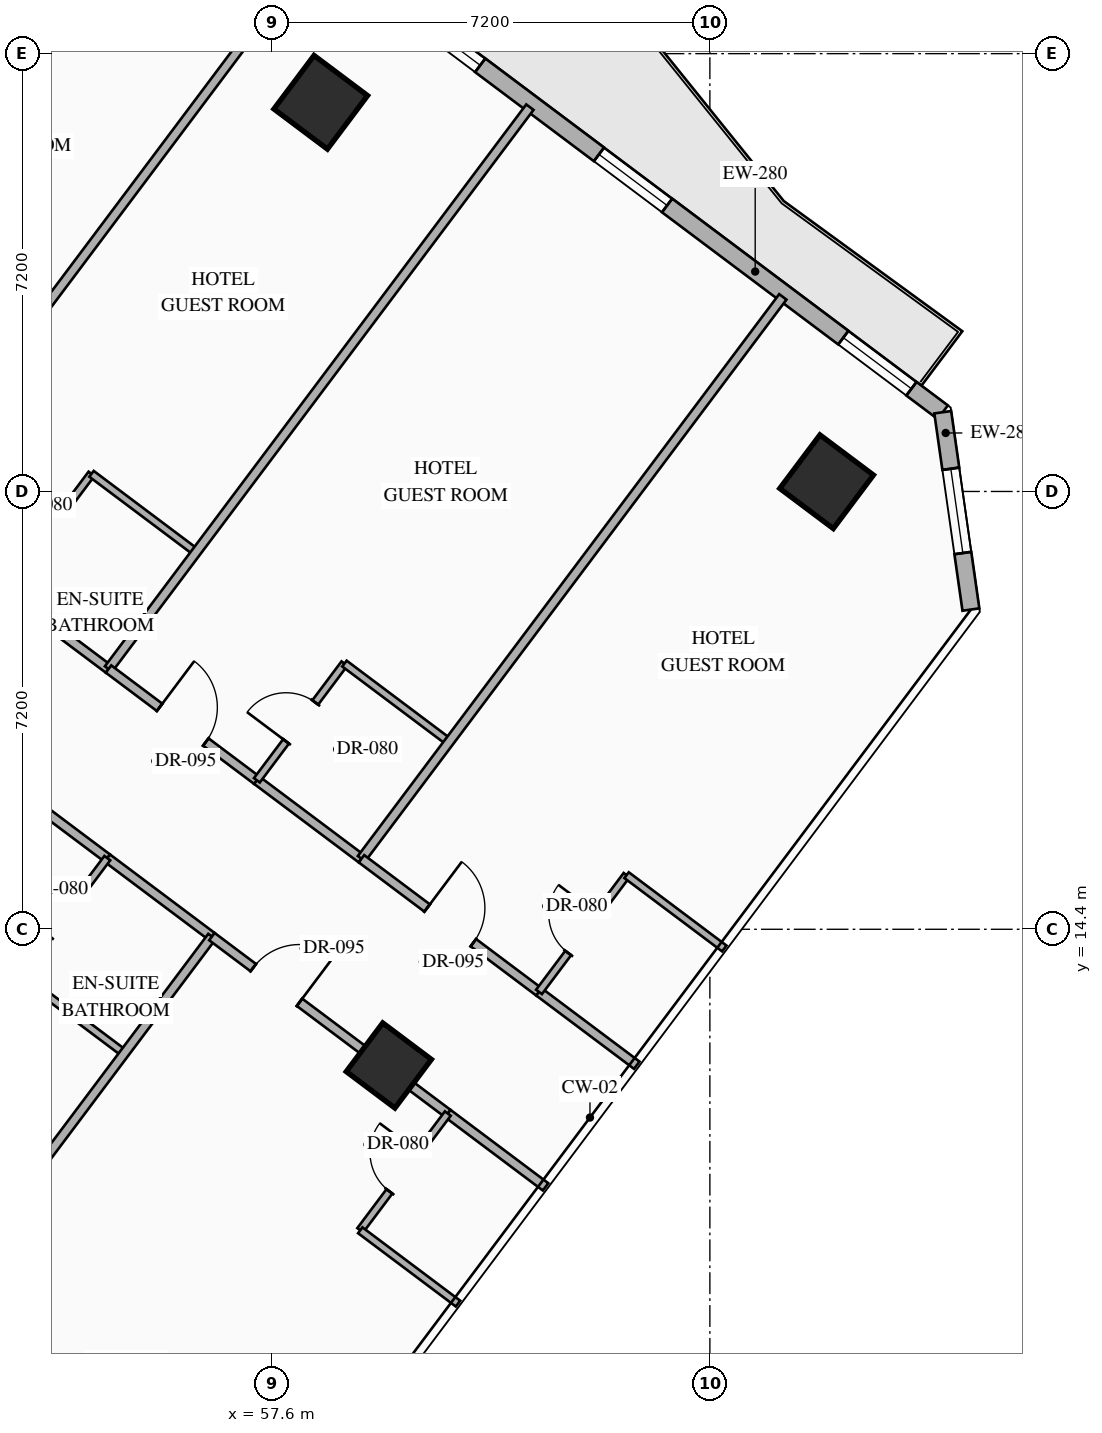
"""IFC4 building model, lengths in metres.
Left out: names, types, materials, properties, quantities, classifications, styles, units other than length and angle.
Written with IfcOpenShell. Run it as: python <this file> out.ifc"""

import sys

from ifc_helpers import new_model, si_unit, direction, frame, frame_2d, origin, origin_2d, place, context, subcontext, project, spatial, rectangle, hollow_rectangle, extrude, element, fill, save


model = new_model("IFC4")
c1 = context("Model", 3, precision=1e-05, world=origin(), true_north=direction((0.0, 1.0)))
c2 = subcontext(c1, "Body", "Model", "MODEL_VIEW")
j1 = project(units=[si_unit("LENGTHUNIT", "METRE"), si_unit("PLANEANGLEUNIT", "RADIAN")], contexts=[c1])
p1 = place(None, origin())
s1 = spatial("IfcSite", under=j1, at=p1, CompositionType="ELEMENT")
p2 = place(p1, origin())
s2 = spatial("IfcBuilding", under=s1, at=p2, CompositionType="ELEMENT")
p3 = place(p2, frame((0.0, 0.0, 46.65)))
s3 = spatial("IfcBuildingStorey", under=s2, at=p3, CompositionType="ELEMENT", Elevation=46.65)
for number, where, z_axis, x_axis in (
    (1, (58.4, 28.0, 0.0), (0.0, 0.0, 1.0), (0.8, -0.6, 0.0)),
    (2, (66.72, 21.76, 0.0), (0.0, 0.0, 1.0), (0.8, -0.6, 0.0)),
):
    element("IfcColumn", number, at=place(p3, frame(where, z_axis=z_axis, x_axis=x_axis)), inside=s3, PredefinedType="COLUMN", context=c2, shape_type="SweptSolid", body=[
        extrude(hollow_rectangle(XDim=1.1, YDim=1.1, WallThickness=0.04, at=origin_2d()), origin(), (0.0, 0.0, 1.0), 3.35),
    ])
p4 = place(p3, frame((59.52, 12.16, 0.0), z_axis=(0.0, 0.0, 1.0), x_axis=(0.799999996291, -0.600000004945, 0.0)))
e3 = element("IfcColumn", 3, at=p4, inside=s3, PredefinedType="COLUMN", context=c2, shape_type="SweptSolid", body=[
    extrude(hollow_rectangle(XDim=1.0, YDim=1.0, WallThickness=0.038, at=origin_2d()), origin(), (0.0, 0.0, 1.0), 3.35),
])
p5 = place(p3, frame((44.86, 40.73, 0.0), z_axis=(0.0, 0.0, 1.0), x_axis=(0.800006902154, -0.599990797017, 0.0)))
e4 = element("IfcWall", 4, at=p5, inside=s3, PredefinedType="STANDARD", context=c2, shape_type="SweptSolid", body=[
    extrude(rectangle(XDim=29.712, YDim=0.28, at=frame_2d((14.856, 0.0))), origin(), (0.0, 0.0, 1.0), 3.13),
])
p6 = place(p5, frame((14.249, 0.0, 0.0)))
e5 = element("IfcOpeningElement", 5, at=p6, cuts=e4, PredefinedType="OPENING", context=c2, shape_type="SweptSolid", body=[
    extrude(rectangle(XDim=1.1, YDim=2.2, at=frame_2d((0.55, 1.1))), frame((0.0, 0.15, 0.0), z_axis=(0.0, -1.0, 0.0), x_axis=(1.0, 0.0, 0.0)), (0.0, 0.0, 1.0), 0.3),
])
p7 = place(p5, frame((1.612, 0.0, 0.85)))
e6 = element("IfcOpeningElement", 6, at=p7, cuts=e4, PredefinedType="OPENING", context=c2, shape_type="SweptSolid", body=[
    extrude(rectangle(XDim=1.4, YDim=1.8, at=frame_2d((0.7, 0.9))), frame((0.0, 0.15, 0.0), z_axis=(0.0, -1.0, 0.0), x_axis=(1.0, 0.0, 0.0)), (0.0, 0.0, 1.0), 0.3),
])
p8 = place(p5, frame((5.667, 0.0, 0.85)))
e7 = element("IfcOpeningElement", 7, at=p8, cuts=e4, PredefinedType="OPENING", context=c2, shape_type="SweptSolid", body=[
    extrude(rectangle(XDim=1.4, YDim=1.8, at=frame_2d((0.7, 0.9))), frame((0.0, 0.15, 0.0), z_axis=(0.0, -1.0, 0.0), x_axis=(1.0, 0.0, 0.0)), (0.0, 0.0, 1.0), 0.3),
])
p9 = place(p5, frame((9.912, 0.0, 0.85)))
e8 = element("IfcOpeningElement", 8, at=p9, cuts=e4, PredefinedType="OPENING", context=c2, shape_type="SweptSolid", body=[
    extrude(rectangle(XDim=1.4, YDim=1.8, at=frame_2d((0.7, 0.9))), frame((0.0, 0.15, 0.0), z_axis=(0.0, -1.0, 0.0), x_axis=(1.0, 0.0, 0.0)), (0.0, 0.0, 1.0), 0.3),
])
p10 = place(p5, frame((18.803, 0.0, 0.85)))
e9 = element("IfcOpeningElement", 9, at=p10, cuts=e4, PredefinedType="OPENING", context=c2, shape_type="SweptSolid", body=[
    extrude(rectangle(XDim=1.4, YDim=1.8, at=frame_2d((0.7, 0.9))), frame((0.0, 0.15, 0.0), z_axis=(0.0, -1.0, 0.0), x_axis=(1.0, 0.0, 0.0)), (0.0, 0.0, 1.0), 0.3),
])
p11 = place(p5, frame((22.645, 0.0, 0.85)))
e10 = element("IfcOpeningElement", 10, at=p11, cuts=e4, PredefinedType="OPENING", context=c2, shape_type="SweptSolid", body=[
    extrude(rectangle(XDim=1.4, YDim=1.8, at=frame_2d((0.7, 0.9))), frame((0.0, 0.15, 0.0), z_axis=(0.0, -1.0, 0.0), x_axis=(1.0, 0.0, 0.0)), (0.0, 0.0, 1.0), 0.3),
])
p12 = place(p5, frame((27.668, 0.0, 0.85)))
e11 = element("IfcOpeningElement", 11, at=p12, cuts=e4, PredefinedType="OPENING", context=c2, shape_type="SweptSolid", body=[
    extrude(rectangle(XDim=1.4, YDim=1.8, at=frame_2d((0.7, 0.9))), frame((0.0, 0.15, 0.0), z_axis=(0.0, -1.0, 0.0), x_axis=(1.0, 0.0, 0.0)), (0.0, 0.0, 1.0), 0.3),
])
p13 = place(p3, frame((68.63, 22.903, 0.0), z_axis=(0.0, 0.0, 1.0), x_axis=(0.141285803956, -0.989968848803, 0.0)))
e12 = element("IfcWall", 12, at=p13, inside=s3, PredefinedType="STANDARD", context=c2, shape_type="SweptSolid", body=[
    extrude(rectangle(XDim=3.278, YDim=0.28, at=frame_2d((1.639, 0.0))), origin(), (0.0, 0.0, 1.0), 3.13),
])
p14 = place(p13, frame((0.939, 0.0, 0.85)))
e13 = element("IfcOpeningElement", 13, at=p14, cuts=e12, PredefinedType="OPENING", context=c2, shape_type="SweptSolid", body=[
    extrude(rectangle(XDim=1.4, YDim=1.8, at=frame_2d((0.7, 0.9))), frame((0.0, 0.15, 0.0), z_axis=(0.0, -1.0, 0.0), x_axis=(1.0, 0.0, 0.0)), (0.0, 0.0, 1.0), 0.3),
])
for number, where, z_axis, x_axis in (
    (14, (47.87, 23.96, 0.0), (0.0, 0.0, 1.0), (0.6, 0.8, 0.0)),
    (15, (51.39, 21.32, 0.0), (0.0, 0.0, 1.0), (0.6, 0.8, 0.0)),
):
    element("IfcWall", number, at=place(p3, frame(where, z_axis=z_axis, x_axis=x_axis)), inside=s3, PredefinedType="PARTITIONING", context=c2, shape_type="SweptSolid", body=[
        extrude(rectangle(XDim=11.55, YDim=0.15, at=frame_2d((5.775, 0.0))), origin(), (0.0, 0.0, 1.0), 3.13),
    ])
p15 = place(p3, frame((53.19, 19.97, 0.0), z_axis=(0.0, 0.0, 1.0), x_axis=(0.79998637334, -0.60001816845, 0.0)))
e16 = element("IfcWall", 16, at=p15, inside=s3, PredefinedType="PARTITIONING", context=c2, shape_type="SweptSolid", body=[
    extrude(rectangle(XDim=2.15, YDim=0.15, at=frame_2d((1.075, 0.0))), origin(), (0.0, 0.0, 1.0), 2.775),
])
p16 = place(p3, frame((53.19, 19.97, 0.0), z_axis=(0.0, 0.0, 1.0), x_axis=(0.6, 0.8, 0.0)))
e17 = element("IfcWall", 17, at=p16, inside=s3, PredefinedType="PARTITIONING", context=c2, shape_type="SweptSolid", body=[
    extrude(rectangle(XDim=2.4, YDim=0.12, at=frame_2d((1.2, 0.0))), origin(), (0.0, 0.0, 1.0), 3.13),
])
p17 = place(p16, frame((0.8, 0.0, 0.0)))
e18 = element("IfcOpeningElement", 18, at=p17, cuts=e17, PredefinedType="OPENING", context=c2, shape_type="SweptSolid", body=[
    extrude(rectangle(XDim=0.8, YDim=2.06, at=frame_2d((0.4, 1.03))), frame((0.0, 0.07, 0.0), z_axis=(0.0, -1.0, 0.0), x_axis=(1.0, 0.0, 0.0)), (0.0, 0.0, 1.0), 0.14),
])
p18 = place(p3, frame((54.63, 21.89, 0.0), z_axis=(0.0, 0.0, 1.0), x_axis=(0.800081749437, -0.599890985279, 0.0)))
e19 = element("IfcWall", 19, at=p18, inside=s3, PredefinedType="PARTITIONING", context=c2, shape_type="SweptSolid", body=[
    extrude(rectangle(XDim=2.15, YDim=0.12, at=frame_2d((1.075, 0.0))), origin(), (0.0, 0.0, 1.0), 3.13),
])
p19 = place(p3, frame((54.91, 18.68, 0.0), z_axis=(0.0, 0.0, 1.0), x_axis=(0.60001014597, 0.799992390422, 0.0)))
e20 = element("IfcWall", 20, at=p19, inside=s3, PredefinedType="PARTITIONING", context=c2, shape_type="SweptSolid", body=[
    extrude(rectangle(XDim=11.55, YDim=0.15, at=frame_2d((5.775, 0.0))), origin(), (0.0, 0.0, 1.0), 3.13),
])
p20 = place(p3, frame((54.91, 18.68, 0.0), z_axis=(0.0, 0.0, 1.0), x_axis=(0.800048024332, -0.599935962218, 0.0)))
e21 = element("IfcWall", 21, at=p20, inside=s3, PredefinedType="PARTITIONING", context=c2, shape_type="SweptSolid", body=[
    extrude(rectangle(XDim=3.05, YDim=0.15, at=frame_2d((1.525, 0.0))), origin(), (0.0, 0.0, 1.0), 2.775),
])
p21 = place(p20, frame((1.05, 0.0, 0.0)))
e22 = element("IfcOpeningElement", 22, at=p21, cuts=e21, PredefinedType="OPENING", context=c2, shape_type="SweptSolid", body=[
    extrude(rectangle(XDim=0.95, YDim=2.15, at=frame_2d((0.475, 1.075))), frame((0.0, 0.085, 0.0), z_axis=(0.0, -1.0, 0.0), x_axis=(1.0, 0.0, 0.0)), (0.0, 0.0, 1.0), 0.17),
])
p22 = place(p3, frame((57.35, 16.85, 0.0), z_axis=(0.0, 0.0, 1.0), x_axis=(0.79998637334, -0.60001816845, 0.0)))
e23 = element("IfcWall", 23, at=p22, inside=s3, PredefinedType="PARTITIONING", context=c2, shape_type="SweptSolid", body=[
    extrude(rectangle(XDim=2.15, YDim=0.15, at=frame_2d((1.075, 0.0))), origin(), (0.0, 0.0, 1.0), 2.775),
])
p23 = place(p3, frame((57.35, 16.85, 0.0), z_axis=(0.0, 0.0, 1.0), x_axis=(0.6, 0.8, 0.0)))
e24 = element("IfcWall", 24, at=p23, inside=s3, PredefinedType="PARTITIONING", context=c2, shape_type="SweptSolid", body=[
    extrude(rectangle(XDim=2.4, YDim=0.12, at=frame_2d((1.2, 0.0))), origin(), (0.0, 0.0, 1.0), 3.13),
])
p24 = place(p23, frame((0.8, 0.0, 0.0)))
e25 = element("IfcOpeningElement", 25, at=p24, cuts=e24, PredefinedType="OPENING", context=c2, shape_type="SweptSolid", body=[
    extrude(rectangle(XDim=0.8, YDim=2.06, at=frame_2d((0.4, 1.03))), frame((0.0, 0.07, 0.0), z_axis=(0.0, -1.0, 0.0), x_axis=(1.0, 0.0, 0.0)), (0.0, 0.0, 1.0), 0.14),
])
p25 = place(p3, frame((58.79, 18.77, 0.0), z_axis=(0.0, 0.0, 1.0), x_axis=(0.79998637334, -0.60001816845, 0.0)))
e26 = element("IfcWall", 26, at=p25, inside=s3, PredefinedType="PARTITIONING", context=c2, shape_type="SweptSolid", body=[
    extrude(rectangle(XDim=2.15, YDim=0.12, at=frame_2d((1.075, 0.0))), origin(), (0.0, 0.0, 1.0), 3.13),
])
p26 = place(p3, frame((59.07, 15.56, 0.0), z_axis=(0.0, 0.0, 1.0), x_axis=(0.599996617946, 0.80000253653, 0.0)))
e27 = element("IfcWall", 27, at=p26, inside=s3, PredefinedType="PARTITIONING", context=c2, shape_type="SweptSolid", body=[
    extrude(rectangle(XDim=11.55, YDim=0.15, at=frame_2d((5.775, 0.0))), origin(), (0.0, 0.0, 1.0), 3.13),
])
p27 = place(p3, frame((59.07, 15.56, 0.0), z_axis=(0.0, 0.0, 1.0), x_axis=(0.8, -0.6, 0.0)))
e28 = element("IfcWall", 28, at=p27, inside=s3, PredefinedType="PARTITIONING", context=c2, shape_type="SweptSolid", body=[
    extrude(rectangle(XDim=3.65, YDim=0.15, at=frame_2d((1.825, 0.0))), origin(), (0.0, 0.0, 1.0), 2.775),
])
p28 = place(p27, frame((1.35, 0.0, 0.0)))
e29 = element("IfcOpeningElement", 29, at=p28, cuts=e28, PredefinedType="OPENING", context=c2, shape_type="SweptSolid", body=[
    extrude(rectangle(XDim=0.95, YDim=2.15, at=frame_2d((0.475, 1.075))), frame((0.0, 0.085, 0.0), z_axis=(0.0, -1.0, 0.0), x_axis=(1.0, 0.0, 0.0)), (0.0, 0.0, 1.0), 0.17),
])
p29 = place(p3, frame((61.99, 13.37, 0.0), z_axis=(0.0, 0.0, 1.0), x_axis=(0.79997084737, -0.600038868206, 0.0)))
e30 = element("IfcWall", 30, at=p29, inside=s3, PredefinedType="PARTITIONING", context=c2, shape_type="SweptSolid", body=[
    extrude(rectangle(XDim=2.01, YDim=0.15, at=frame_2d((1.005, 0.0))), origin(), (0.0, 0.0, 1.0), 3.13),
])
p30 = place(p3, frame((61.99, 13.37, 0.0), z_axis=(0.0, 0.0, 1.0), x_axis=(0.6, 0.8, 0.0)))
e31 = element("IfcWall", 31, at=p30, inside=s3, PredefinedType="PARTITIONING", context=c2, shape_type="SweptSolid", body=[
    extrude(rectangle(XDim=2.4, YDim=0.12, at=frame_2d((1.2, 0.0))), origin(), (0.0, 0.0, 1.0), 3.13),
])
p31 = place(p30, frame((0.8, 0.0, 0.0)))
e32 = element("IfcOpeningElement", 32, at=p31, cuts=e31, PredefinedType="OPENING", context=c2, shape_type="SweptSolid", body=[
    extrude(rectangle(XDim=0.8, YDim=2.06, at=frame_2d((0.4, 1.03))), frame((0.0, 0.07, 0.0), z_axis=(0.0, -1.0, 0.0), x_axis=(1.0, 0.0, 0.0)), (0.0, 0.0, 1.0), 0.14),
])
p32 = place(p3, frame((63.43, 15.29, 0.0), z_axis=(0.0, 0.0, 1.0), x_axis=(0.800014574191, -0.599980567254, 0.0)))
e33 = element("IfcWall", 33, at=p32, inside=s3, PredefinedType="PARTITIONING", context=c2, shape_type="SweptSolid", body=[
    extrude(rectangle(XDim=2.01, YDim=0.12, at=frame_2d((1.005, 0.0))), origin(), (0.0, 0.0, 1.0), 3.13),
])
p33 = place(p3, frame((46.37, 21.96, 0.0), z_axis=(0.0, 0.0, 1.0), x_axis=(0.799997249048, -0.600003667918, 0.0)))
e34 = element("IfcWall", 34, at=p33, inside=s3, PredefinedType="PARTITIONING", context=c2, shape_type="SweptSolid", body=[
    extrude(rectangle(XDim=10.65, YDim=0.15, at=frame_2d((5.325, 0.0))), origin(), (0.0, 0.0, 1.0), 2.425),
])
p34 = place(p33, frame((3.062, 0.0, 0.0)))
e35 = element("IfcOpeningElement", 35, at=p34, cuts=e34, PredefinedType="OPENING", context=c2, shape_type="SweptSolid", body=[
    extrude(rectangle(XDim=0.95, YDim=2.15, at=frame_2d((0.475, 1.075))), frame((0.0, 0.085, 0.0), z_axis=(0.0, -1.0, 0.0), x_axis=(1.0, 0.0, 0.0)), (0.0, 0.0, 1.0), 0.17),
])
p35 = place(p3, frame((54.89, 15.57, 0.0), z_axis=(0.0, 0.0, 1.0), x_axis=(0.800027249606, -0.599963665473, 0.0)))
e36 = element("IfcWall", 36, at=p35, inside=s3, PredefinedType="PARTITIONING", context=c2, shape_type="SweptSolid", body=[
    extrude(rectangle(XDim=2.15, YDim=0.15, at=frame_2d((1.075, 0.0))), origin(), (0.0, 0.0, 1.0), 2.425),
])
p36 = place(p3, frame((53.45, 13.65, 0.0), z_axis=(0.0, 0.0, 1.0), x_axis=(0.599951172744, 0.800036618114, 0.0)))
e37 = element("IfcWall", 37, at=p36, inside=s3, PredefinedType="PARTITIONING", context=c2, shape_type="SweptSolid", body=[
    extrude(rectangle(XDim=2.4, YDim=0.12, at=frame_2d((1.2, 0.0))), origin(), (0.0, 0.0, 1.0), 3.13),
])
p37 = place(p36, frame((0.8, 0.0, 0.0)))
e38 = element("IfcOpeningElement", 38, at=p37, cuts=e37, PredefinedType="OPENING", context=c2, shape_type="SweptSolid", body=[
    extrude(rectangle(XDim=0.8, YDim=2.06, at=frame_2d((0.4, 1.03))), frame((0.0, 0.07, 0.0), z_axis=(0.0, -1.0, 0.0), x_axis=(1.0, 0.0, 0.0)), (0.0, 0.0, 1.0), 0.14),
])
p38 = place(p3, frame((53.45, 13.65, 0.0), z_axis=(0.0, 0.0, 1.0), x_axis=(0.800040880289, -0.59994548908, 0.0)))
e39 = element("IfcWall", 39, at=p38, inside=s3, PredefinedType="PARTITIONING", context=c2, shape_type="SweptSolid", body=[
    extrude(rectangle(XDim=2.15, YDim=0.12, at=frame_2d((1.075, 0.0))), origin(), (0.0, 0.0, 1.0), 3.13),
])
p39 = place(p3, frame((49.8, 5.2, 0.0), z_axis=(0.0, 0.0, 1.0), x_axis=(0.6, 0.8, 0.0)))
e40 = element("IfcWall", 40, at=p39, inside=s3, PredefinedType="PARTITIONING", context=c2, shape_type="SweptSolid", body=[
    extrude(rectangle(XDim=11.35, YDim=0.15, at=frame_2d((5.675, 0.0))), origin(), (0.0, 0.0, 1.0), 3.13),
])
p40 = place(p3, frame((56.61, 14.28, 0.0), z_axis=(0.0, 0.0, 1.0), x_axis=(0.8, -0.6, 0.0)))
e41 = element("IfcWall", 41, at=p40, inside=s3, PredefinedType="PARTITIONING", context=c2, shape_type="SweptSolid", body=[
    extrude(rectangle(XDim=4.85, YDim=0.15, at=frame_2d((2.425, 0.0))), origin(), (0.0, 0.0, 1.0), 2.425),
])
p41 = place(p40, frame((0.851, 0.0, 0.0)))
e42 = element("IfcOpeningElement", 42, at=p41, cuts=e41, PredefinedType="OPENING", context=c2, shape_type="SweptSolid", body=[
    extrude(rectangle(XDim=0.95, YDim=2.15, at=frame_2d((0.475, 1.075))), frame((0.0, 0.085, 0.0), z_axis=(0.0, -1.0, 0.0), x_axis=(1.0, 0.0, 0.0)), (0.0, 0.0, 1.0), 0.17),
])
p42 = place(p3, frame((60.49, 11.37, 0.0), z_axis=(0.0, 0.0, 1.0), x_axis=(0.79997084737, -0.600038868206, 0.0)))
e43 = element("IfcWall", 43, at=p42, inside=s3, PredefinedType="PARTITIONING", context=c2, shape_type="SweptSolid", body=[
    extrude(rectangle(XDim=2.01, YDim=0.15, at=frame_2d((1.005, 0.0))), origin(), (0.0, 0.0, 1.0), 3.13),
])
p43 = place(p3, frame((59.05, 9.45, 0.0), z_axis=(0.0, 0.0, 1.0), x_axis=(0.599951172744, 0.800036618114, 0.0)))
e44 = element("IfcWall", 44, at=p43, inside=s3, PredefinedType="PARTITIONING", context=c2, shape_type="SweptSolid", body=[
    extrude(rectangle(XDim=2.4, YDim=0.12, at=frame_2d((1.2, 0.0))), origin(), (0.0, 0.0, 1.0), 3.13),
])
p44 = place(p43, frame((0.8, 0.0, 0.0)))
e45 = element("IfcOpeningElement", 45, at=p44, cuts=e44, PredefinedType="OPENING", context=c2, shape_type="SweptSolid", body=[
    extrude(rectangle(XDim=0.8, YDim=2.06, at=frame_2d((0.4, 1.03))), frame((0.0, 0.07, 0.0), z_axis=(0.0, -1.0, 0.0), x_axis=(1.0, 0.0, 0.0)), (0.0, 0.0, 1.0), 0.14),
])
p45 = place(p3, frame((59.05, 9.45, 0.0), z_axis=(0.0, 0.0, 1.0), x_axis=(0.79997084737, -0.600038868206, 0.0)))
e46 = element("IfcWall", 46, at=p45, inside=s3, PredefinedType="PARTITIONING", context=c2, shape_type="SweptSolid", body=[
    extrude(rectangle(XDim=2.01, YDim=0.12, at=frame_2d((1.005, 0.0))), origin(), (0.0, 0.0, 1.0), 3.13),
])
p46 = place(p10, origin())
e47 = element("IfcWindow", 47, at=p46, inside=s3, PartitioningType="SINGLE_PANEL", PredefinedType="WINDOW", context=c2, shape_type="SweptSolid", body=[
    extrude(rectangle(XDim=1.4, YDim=1.8, at=frame_2d((0.7, 0.9))), frame((0.0, 0.03, 0.0), z_axis=(0.0, -1.0, 0.0), x_axis=(1.0, 0.0, 0.0)), (0.0, 0.0, 1.0), 0.06),
])
fill(e9, e47)
p47 = place(p11, origin())
e48 = element("IfcWindow", 48, at=p47, inside=s3, PartitioningType="SINGLE_PANEL", PredefinedType="WINDOW", context=c2, shape_type="SweptSolid", body=[
    extrude(rectangle(XDim=1.4, YDim=1.8, at=frame_2d((0.7, 0.9))), frame((0.0, 0.03, 0.0), z_axis=(0.0, -1.0, 0.0), x_axis=(1.0, 0.0, 0.0)), (0.0, 0.0, 1.0), 0.06),
])
fill(e10, e48)
p48 = place(p12, origin())
e49 = element("IfcWindow", 49, at=p48, inside=s3, PartitioningType="SINGLE_PANEL", PredefinedType="WINDOW", context=c2, shape_type="SweptSolid", body=[
    extrude(rectangle(XDim=1.4, YDim=1.8, at=frame_2d((0.7, 0.9))), frame((0.0, 0.03, 0.0), z_axis=(0.0, -1.0, 0.0), x_axis=(1.0, 0.0, 0.0)), (0.0, 0.0, 1.0), 0.06),
])
fill(e11, e49)
p49 = place(p14, origin())
e50 = element("IfcWindow", 50, at=p49, inside=s3, PartitioningType="SINGLE_PANEL", PredefinedType="WINDOW", context=c2, shape_type="SweptSolid", body=[
    extrude(rectangle(XDim=1.4, YDim=1.8, at=frame_2d((0.7, 0.9))), frame((0.0, 0.03, 0.0), z_axis=(0.0, -1.0, 0.0), x_axis=(1.0, 0.0, 0.0)), (0.0, 0.0, 1.0), 0.06),
])
fill(e13, e50)
p50 = place(p17, origin())
e51 = element("IfcDoor", 51, at=p50, inside=s3, OperationType="SINGLE_SWING_RIGHT", PredefinedType="DOOR", context=c2, shape_type="SweptSolid", body=[
    extrude(rectangle(XDim=0.8, YDim=2.06, at=frame_2d((0.4, 1.03))), frame((0.0, 0.025, 0.0), z_axis=(0.0, -1.0, 0.0), x_axis=(1.0, 0.0, 0.0)), (0.0, 0.0, 1.0), 0.05),
])
fill(e18, e51)
p51 = place(p21, origin())
e52 = element("IfcDoor", 52, at=p51, inside=s3, OperationType="SINGLE_SWING_LEFT", PredefinedType="DOOR", context=c2, shape_type="SweptSolid", body=[
    extrude(rectangle(XDim=0.95, YDim=2.15, at=frame_2d((0.475, 1.075))), frame((0.0, 0.025, 0.0), z_axis=(0.0, -1.0, 0.0), x_axis=(1.0, 0.0, 0.0)), (0.0, 0.0, 1.0), 0.05),
])
fill(e22, e52)
p52 = place(p24, origin())
e53 = element("IfcDoor", 53, at=p52, inside=s3, OperationType="SINGLE_SWING_LEFT", PredefinedType="DOOR", context=c2, shape_type="SweptSolid", body=[
    extrude(rectangle(XDim=0.8, YDim=2.06, at=frame_2d((0.4, 1.03))), frame((0.0, 0.025, 0.0), z_axis=(0.0, -1.0, 0.0), x_axis=(1.0, 0.0, 0.0)), (0.0, 0.0, 1.0), 0.05),
])
fill(e25, e53)
p53 = place(p28, origin())
e54 = element("IfcDoor", 54, at=p53, inside=s3, OperationType="SINGLE_SWING_LEFT", PredefinedType="DOOR", context=c2, shape_type="SweptSolid", body=[
    extrude(rectangle(XDim=0.95, YDim=2.15, at=frame_2d((0.475, 1.075))), frame((0.0, 0.025, 0.0), z_axis=(0.0, -1.0, 0.0), x_axis=(1.0, 0.0, 0.0)), (0.0, 0.0, 1.0), 0.05),
])
fill(e29, e54)
p54 = place(p31, origin())
e55 = element("IfcDoor", 55, at=p54, inside=s3, OperationType="SINGLE_SWING_RIGHT", PredefinedType="DOOR", context=c2, shape_type="SweptSolid", body=[
    extrude(rectangle(XDim=0.8, YDim=2.06, at=frame_2d((0.4, 1.03))), frame((0.0, 0.025, 0.0), z_axis=(0.0, -1.0, 0.0), x_axis=(1.0, 0.0, 0.0)), (0.0, 0.0, 1.0), 0.05),
])
fill(e32, e55)
p55 = place(p37, origin())
e56 = element("IfcDoor", 56, at=p55, inside=s3, OperationType="SINGLE_SWING_RIGHT", PredefinedType="DOOR", context=c2, shape_type="SweptSolid", body=[
    extrude(rectangle(XDim=0.8, YDim=2.06, at=frame_2d((0.4, 1.03))), frame((0.0, 0.025, 0.0), z_axis=(0.0, -1.0, 0.0), x_axis=(1.0, 0.0, 0.0)), (0.0, 0.0, 1.0), 0.05),
])
fill(e38, e56)
p56 = place(p41, origin())
e57 = element("IfcDoor", 57, at=p56, inside=s3, OperationType="SINGLE_SWING_RIGHT", PredefinedType="DOOR", context=c2, shape_type="SweptSolid", body=[
    extrude(rectangle(XDim=0.95, YDim=2.15, at=frame_2d((0.475, 1.075))), frame((0.0, 0.025, 0.0), z_axis=(0.0, -1.0, 0.0), x_axis=(1.0, 0.0, 0.0)), (0.0, 0.0, 1.0), 0.05),
])
fill(e42, e57)
p57 = place(p44, origin())
e58 = element("IfcDoor", 58, at=p57, inside=s3, OperationType="SINGLE_SWING_RIGHT", PredefinedType="DOOR", context=c2, shape_type="SweptSolid", body=[
    extrude(rectangle(XDim=0.8, YDim=2.06, at=frame_2d((0.4, 1.03))), frame((0.0, 0.025, 0.0), z_axis=(0.0, -1.0, 0.0), x_axis=(1.0, 0.0, 0.0)), (0.0, 0.0, 1.0), 0.05),
])
fill(e45, e58)
save(model, sys.argv[1])
